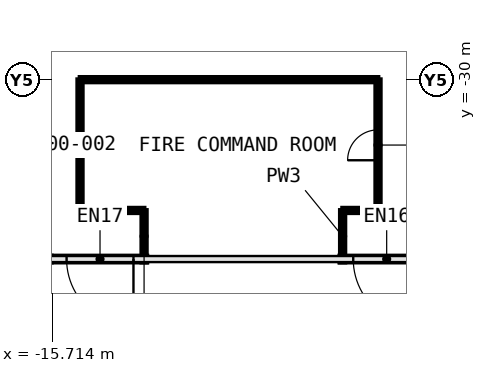
"""IFC4 building model, lengths in metres.
Left out: names, types, materials, properties, quantities, classifications, styles, units other than length and angle.
Written with IfcOpenShell. Run it as: python <this file> out.ifc"""

import sys

from ifc_helpers import new_model, si_unit, direction, frame, frame_2d, origin, place, context, subcontext, project, spatial, rectangle, extrude, element, fill, save


model = new_model("IFC4")
c1 = context("Model", 3, precision=1e-05, world=origin(), true_north=direction((0.0, 1.0)))
c2 = subcontext(c1, "Body", "Model", "MODEL_VIEW")
j1 = project(units=[si_unit("LENGTHUNIT", "METRE"), si_unit("PLANEANGLEUNIT", "RADIAN")], contexts=[c1])
p1 = place(None, origin())
s1 = spatial("IfcSite", under=j1, at=p1, CompositionType="ELEMENT")
p2 = place(p1, origin())
s2 = spatial("IfcBuilding", under=s1, at=p2, CompositionType="ELEMENT")
p3 = place(p2, origin())
s3 = spatial("IfcBuildingStorey", under=s2, at=p3, CompositionType="ELEMENT", Elevation=0.0)
p4 = place(p3, frame((-3.173, -35.9, 0.0), z_axis=(0.0, 0.0, 1.0), x_axis=(-1.0, 0.0, 0.0)))
e1 = element("IfcWall", 1, at=p4, inside=s3, PredefinedType="SOLIDWALL", context=c2, shape_type="SweptSolid", body=[
    extrude(rectangle(XDim=3.083, YDim=0.2, at=frame_2d((1.542, 0.0))), origin(), (0.0, 0.0, 1.0), 2.7),
])
p5 = place(p4, frame((0.441, 0.0, 0.0)))
e2 = element("IfcOpeningElement", 2, at=p5, cuts=e1, PredefinedType="OPENING", context=c2, shape_type="SweptSolid", body=[
    extrude(rectangle(XDim=2.2, YDim=2.4, at=frame_2d((1.1, 1.2))), frame((0.0, 0.11, 0.0), z_axis=(0.0, -1.0, 0.0), x_axis=(1.0, 0.0, 0.0)), (0.0, 0.0, 1.0), 0.22),
])
p6 = place(p3, frame((-12.601, -35.9, 0.0), z_axis=(0.0, 0.0, 1.0), x_axis=(-1.0, 0.0, 0.0)))
e3 = element("IfcWall", 3, at=p6, inside=s3, PredefinedType="SOLIDWALL", context=c2, shape_type="SweptSolid", body=[
    extrude(rectangle(XDim=3.083, YDim=0.2, at=frame_2d((1.542, 0.0))), origin(), (0.0, 0.0, 1.0), 2.7),
])
p7 = place(p6, frame((0.441, 0.0, 0.0)))
e4 = element("IfcOpeningElement", 4, at=p7, cuts=e3, PredefinedType="OPENING", context=c2, shape_type="SweptSolid", body=[
    extrude(rectangle(XDim=2.2, YDim=2.4, at=frame_2d((1.1, 1.2))), frame((0.0, 0.11, 0.0), z_axis=(0.0, -1.0, 0.0), x_axis=(1.0, 0.0, 0.0)), (0.0, 0.0, 1.0), 0.22),
])
p8 = place(p3, frame((-6.163, -36.0, 0.0), z_axis=(0.0, 0.0, 1.0), x_axis=(0.0, 1.0, 0.0)))
e5 = element("IfcWall", 5, at=p8, inside=s3, PredefinedType="PARTITIONING", context=c2, shape_type="SweptSolid", body=[
    extrude(rectangle(XDim=1.699, YDim=0.15, at=frame_2d((0.85, 0.0))), origin(), (0.0, 0.0, 1.0), 8.6),
])
p9 = place(p3, frame((-6.163, -34.301, 0.0), z_axis=(0.0, 0.0, 1.0), x_axis=(1.0, 0.0, 0.0)))
e6 = element("IfcWall", 6, at=p9, inside=s3, PredefinedType="PARTITIONING", context=c2, shape_type="SweptSolid", body=[
    extrude(rectangle(XDim=1.163, YDim=0.15, at=frame_2d((0.582, 0.0))), origin(), (0.0, 0.0, 1.0), 8.6),
])
p10 = place(p3, frame((-4.999, -34.3, 0.0), z_axis=(0.0, 0.0, 1.0), x_axis=(0.0, 1.0, 0.0)))
e7 = element("IfcWall", 7, at=p10, inside=s3, PredefinedType="PARTITIONING", context=c2, shape_type="SweptSolid", body=[
    extrude(rectangle(XDim=4.3, YDim=0.15, at=frame_2d((2.15, 0.0))), origin(), (0.0, 0.0, 1.0), 8.6),
])
p11 = place(p10, frame((1.65, 0.0, 0.0)))
e8 = element("IfcOpeningElement", 8, at=p11, cuts=e7, PredefinedType="OPENING", context=c2, shape_type="SweptSolid", body=[
    extrude(rectangle(XDim=1.0, YDim=2.1, at=frame_2d((0.5, 1.05))), frame((0.0, 0.085, 0.0), z_axis=(0.0, -1.0, 0.0), x_axis=(1.0, 0.0, 0.0)), (0.0, 0.0, 1.0), 0.17),
])
p12 = place(p3, frame((-5.0, -29.999, 0.0), z_axis=(0.0, 0.0, 1.0), x_axis=(-1.0, 0.0, 0.0)))
e9 = element("IfcWall", 9, at=p12, inside=s3, PredefinedType="PARTITIONING", context=c2, shape_type="SweptSolid", body=[
    extrude(rectangle(XDim=9.8, YDim=0.15, at=frame_2d((4.9, 0.0))), origin(), (0.0, 0.0, 1.0), 7.58),
])
p13 = place(p3, frame((-14.801, -30.0, 0.0), z_axis=(0.0, 0.0, 1.0), x_axis=(0.0, -1.0, 0.0)))
e10 = element("IfcWall", 10, at=p13, inside=s3, PredefinedType="PARTITIONING", context=c2, shape_type="SweptSolid", body=[
    extrude(rectangle(XDim=4.3, YDim=0.15, at=frame_2d((2.15, 0.0))), origin(), (0.0, 0.0, 1.0), 8.6),
])
p14 = place(p3, frame((-14.8, -34.301, 0.0), z_axis=(0.0, 0.0, 1.0), x_axis=(1.0, 0.0, 0.0)))
e11 = element("IfcWall", 11, at=p14, inside=s3, PredefinedType="PARTITIONING", context=c2, shape_type="SweptSolid", body=[
    extrude(rectangle(XDim=2.106, YDim=0.15, at=frame_2d((1.053, 0.0))), origin(), (0.0, 0.0, 1.0), 8.6),
])
p15 = place(p3, frame((-12.694, -34.301, 0.0), z_axis=(0.0, 0.0, 1.0), x_axis=(0.0, -1.0, 0.0)))
e12 = element("IfcWall", 12, at=p15, inside=s3, PredefinedType="PARTITIONING", context=c2, shape_type="SweptSolid", body=[
    extrude(rectangle(XDim=1.699, YDim=0.15, at=frame_2d((0.85, 0.0))), origin(), (0.0, 0.0, 1.0), 8.6),
])
p16 = place(p5, origin())
e13 = element("IfcDoor", 13, at=p16, inside=s3, OperationType="DOUBLE_DOOR_DOUBLE_SWING", PredefinedType="DOOR", context=c2, shape_type="SweptSolid", body=[
    extrude(rectangle(XDim=2.2, YDim=2.4, at=frame_2d((1.1, 1.2))), frame((0.0, 0.025, 0.0), z_axis=(0.0, -1.0, 0.0), x_axis=(1.0, 0.0, 0.0)), (0.0, 0.0, 1.0), 0.05),
])
fill(e2, e13)
p17 = place(p7, origin())
e14 = element("IfcDoor", 14, at=p17, inside=s3, OperationType="DOUBLE_DOOR_DOUBLE_SWING", PredefinedType="DOOR", context=c2, shape_type="SweptSolid", body=[
    extrude(rectangle(XDim=2.2, YDim=2.4, at=frame_2d((1.1, 1.2))), frame((0.0, 0.025, 0.0), z_axis=(0.0, -1.0, 0.0), x_axis=(1.0, 0.0, 0.0)), (0.0, 0.0, 1.0), 0.05),
])
fill(e4, e14)
p18 = place(p11, origin())
e15 = element("IfcDoor", 15, at=p18, inside=s3, OperationType="SINGLE_SWING_RIGHT", PredefinedType="DOOR", context=c2, shape_type="SweptSolid", body=[
    extrude(rectangle(XDim=1.0, YDim=2.1, at=frame_2d((0.5, 1.05))), frame((0.0, 0.025, 0.0), z_axis=(0.0, -1.0, 0.0), x_axis=(1.0, 0.0, 0.0)), (0.0, 0.0, 1.0), 0.05),
])
fill(e8, e15)
save(model, sys.argv[1])
